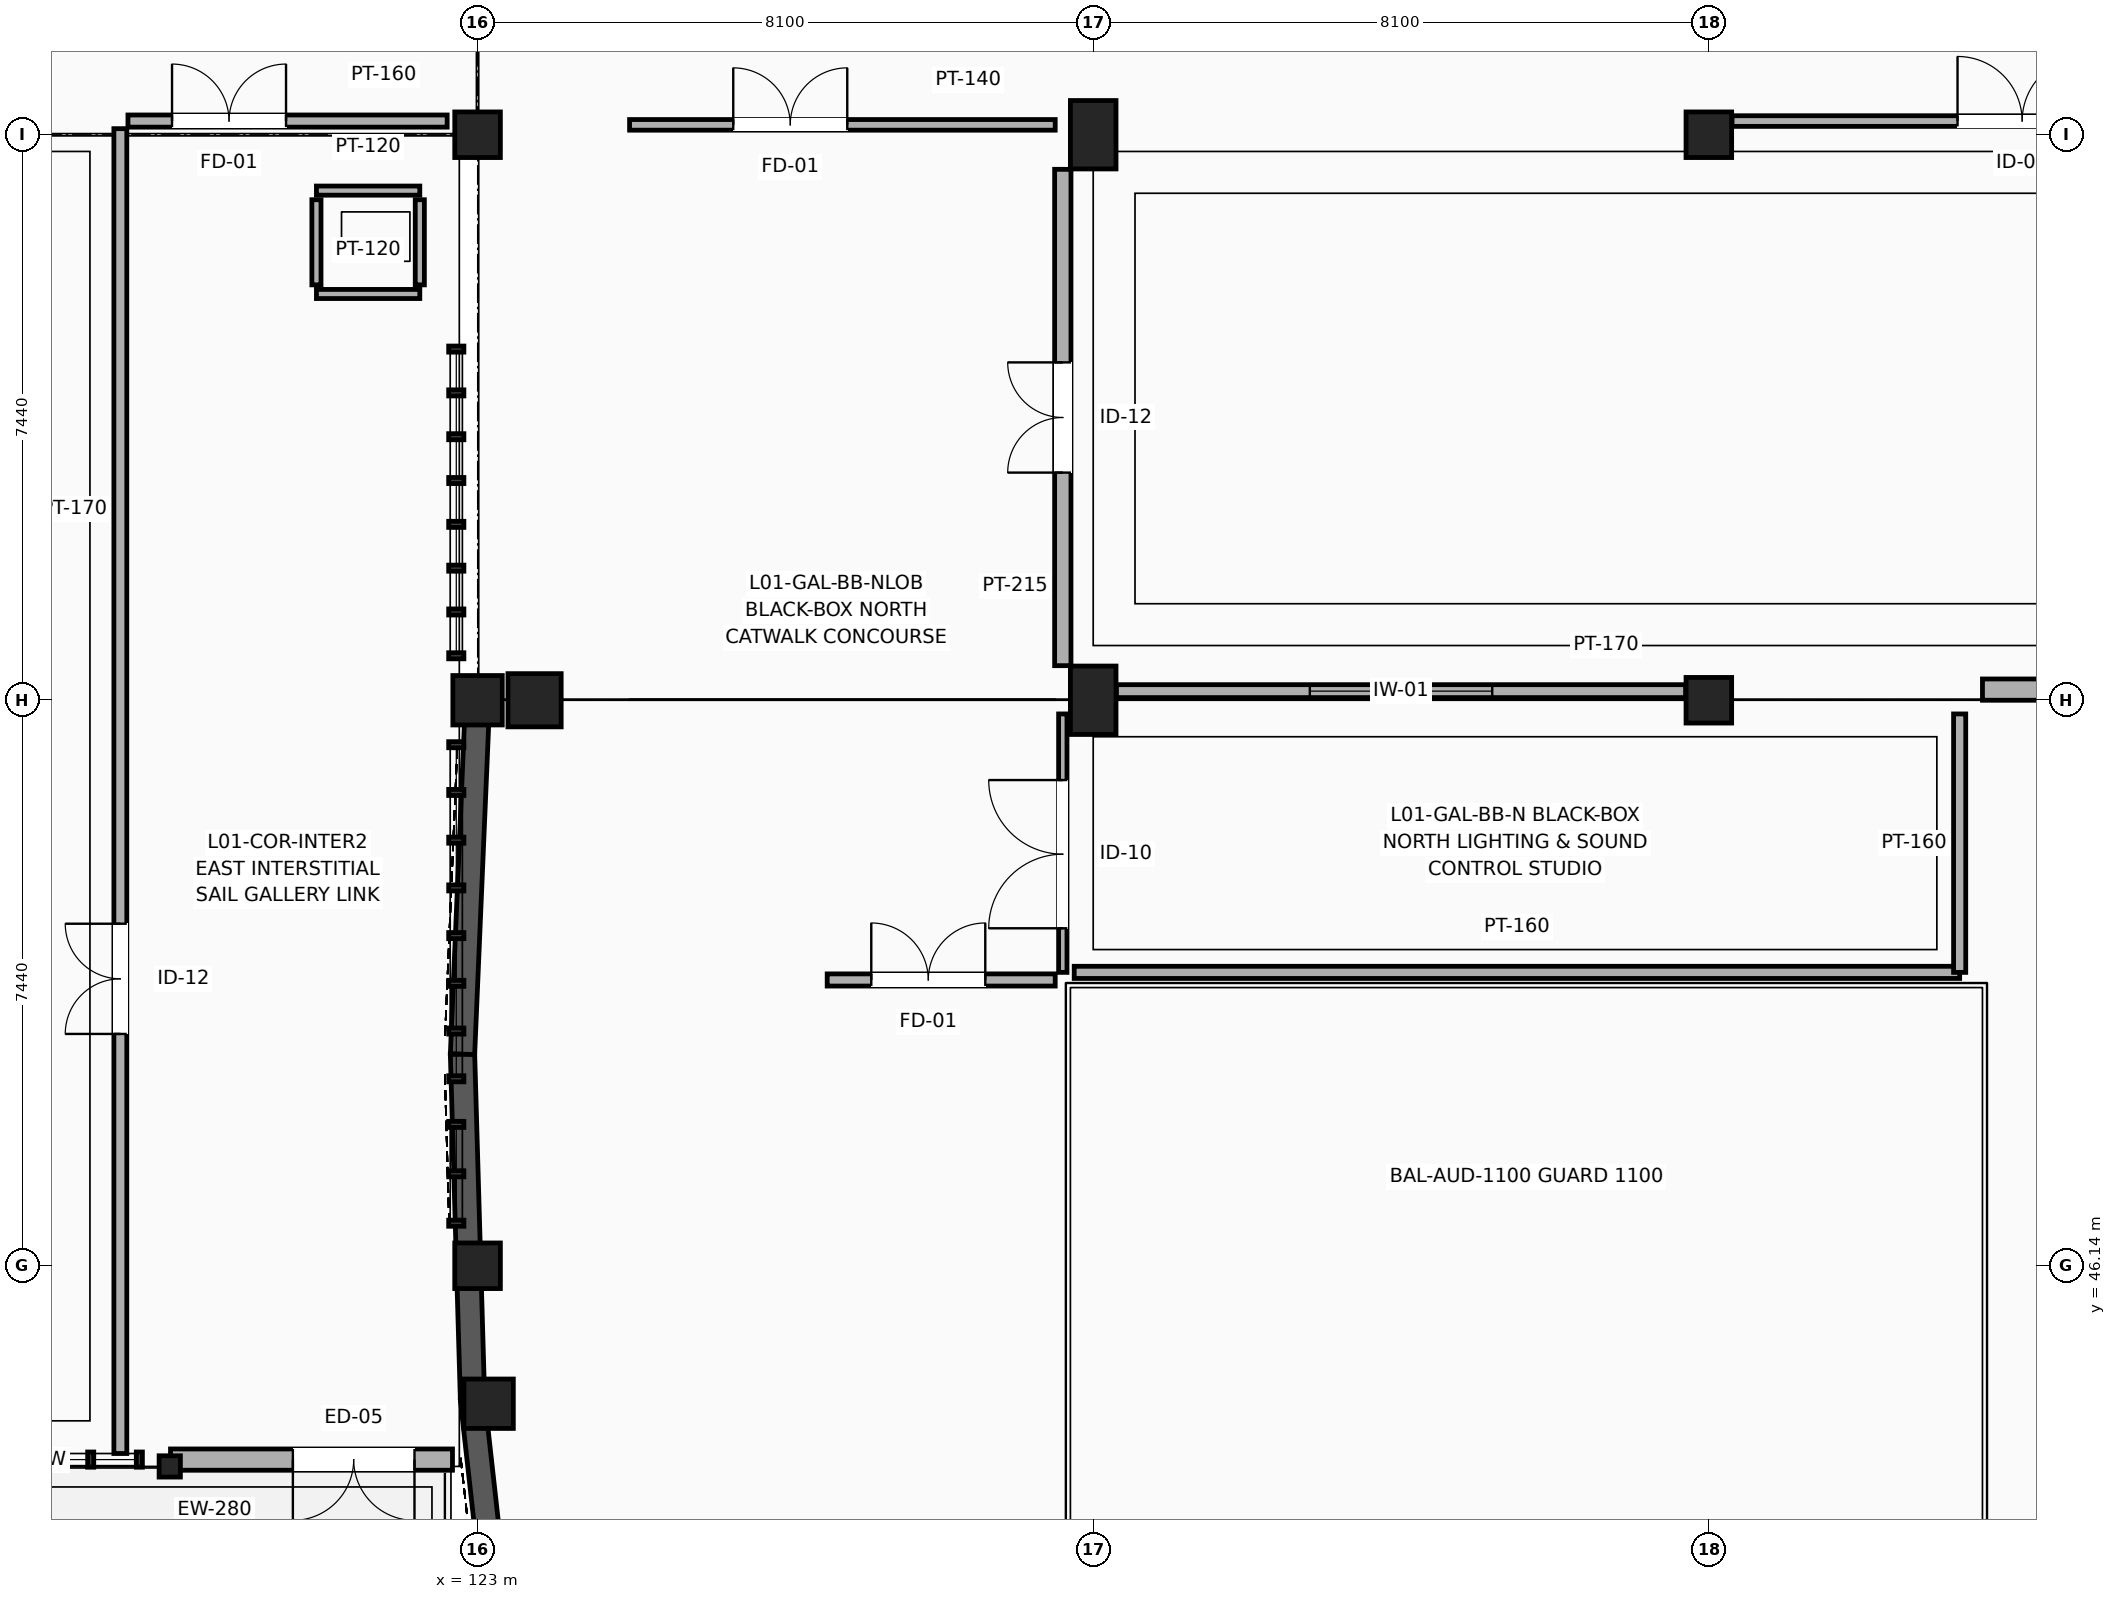
"""IFC4 building model, lengths in metres.
Left out: names, types, materials, properties, quantities, classifications, styles, units other than length and angle.
Written with IfcOpenShell. Run it as: python <this file> out.ifc"""

import sys

from ifc_helpers import new_model, si_unit, direction, frame, frame_2d, origin, origin_2d, place, context, subcontext, project, spatial, rectangle, circle, i_section, extrude, element, fill, save


model = new_model("IFC4")
c1 = context("Model", 3, precision=1e-05, world=origin(), true_north=direction((0.0, 1.0)))
c2 = subcontext(c1, "Body", "Model", "MODEL_VIEW")
j1 = project(units=[si_unit("LENGTHUNIT", "METRE"), si_unit("PLANEANGLEUNIT", "RADIAN")], contexts=[c1])
p1 = place(None, origin())
s1 = spatial("IfcSite", under=j1, at=p1, CompositionType="ELEMENT")
p2 = place(p1, origin())
s2 = spatial("IfcBuilding", under=s1, at=p2, CompositionType="ELEMENT")
p3 = place(p2, frame((0.0, 0.0, 5.4)))
s3 = spatial("IfcBuildingStorey", under=s2, at=p3, CompositionType="ELEMENT", Elevation=5.4)
p4 = place(p3, frame((123.0, 46.14, 0.0), z_axis=(0.0, 0.0, 1.0), x_axis=(1.0, 0.0, 0.0)))
e1 = element("IfcColumn", 1, at=p4, inside=s3, PredefinedType="COLUMN", context=c2, shape_type="SweptSolid", body=[
    extrude(rectangle(XDim=0.6, YDim=0.6, at=origin_2d()), origin(), (0.0, 0.0, 1.0), 4.8),
])
p5 = place(p3, frame((123.0, 53.58, 0.0), z_axis=(0.0, 0.0, 1.0), x_axis=(1.0, 0.0, 0.0)))
e2 = element("IfcColumn", 2, at=p5, inside=s3, PredefinedType="COLUMN", context=c2, shape_type="SweptSolid", body=[
    extrude(circle(Radius=0.325, at=origin_2d()), origin(), (0.0, 0.0, 1.0), 4.8),
])
p6 = place(p3, frame((123.0, 61.02, 0.0), z_axis=(0.0, 0.0, 1.0), x_axis=(1.0, 0.0, 0.0)))
e3 = element("IfcColumn", 3, at=p6, inside=s3, PredefinedType="COLUMN", context=c2, shape_type="SweptSolid", body=[
    extrude(rectangle(XDim=0.6, YDim=0.6, at=origin_2d()), origin(), (0.0, 0.0, 1.0), 4.8),
])
for number, where, z_axis, x_axis in (
    (4, (131.1, 53.58, 0.0), (0.0, 0.0, 1.0), (1.0, 0.0, 0.0)),
    (5, (131.1, 61.02, 0.0), (0.0, 0.0, 1.0), (1.0, 0.0, 0.0)),
):
    element("IfcColumn", number, at=place(p3, frame(where, z_axis=z_axis, x_axis=x_axis)), inside=s3, PredefinedType="COLUMN", context=c2, shape_type="SweptSolid", body=[
        extrude(rectangle(XDim=0.6, YDim=0.9, at=origin_2d()), origin(), (0.0, 0.0, 1.0), 4.8),
    ])
for number, where, z_axis, x_axis in (
    (6, (139.2, 53.58, 0.0), (0.0, 0.0, 1.0), (1.0, 0.0, 0.0)),
    (7, (139.2, 61.02, 0.0), (0.0, 0.0, 1.0), (1.0, 0.0, 0.0)),
):
    element("IfcColumn", number, at=place(p3, frame(where, z_axis=z_axis, x_axis=x_axis)), inside=s3, PredefinedType="COLUMN", context=c2, shape_type="SweptSolid", body=[
        extrude(rectangle(XDim=0.6, YDim=0.6, at=origin_2d()), origin(), (0.0, 0.0, 1.0), 4.8),
    ])
p7 = place(p3, frame((123.75, 53.58, 0.0), z_axis=(0.0, 0.0, 1.0), x_axis=(1.0, 0.0, 0.0)))
e8 = element("IfcColumn", 8, at=p7, inside=s3, PredefinedType="COLUMN", context=c2, shape_type="SweptSolid", body=[
    extrude(rectangle(XDim=0.7, YDim=0.7, at=origin_2d()), origin(), (0.0, 0.0, 1.0), 7.035),
])
p8 = place(p3, frame((123.146, 44.325, 0.0), z_axis=(0.0, 0.0, 1.0), x_axis=(1.0, 0.0, 0.0)))
e9 = element("IfcColumn", 9, at=p8, inside=s3, PredefinedType="COLUMN", context=c2, shape_type="SweptSolid", body=[
    extrude(circle(Radius=0.325, at=origin_2d()), origin(), (0.0, 0.0, 1.0), 8.733),
])
p9 = place(p3, frame((118.95, 43.5, 0.0), z_axis=(0.0, 0.0, 1.0), x_axis=(1.0, 0.0, 0.0)))
e10 = element("IfcColumn", 10, at=p9, inside=s3, PredefinedType="COLUMN", context=c2, shape_type="SweptSolid", body=[
    extrude(i_section(OverallWidth=0.28, OverallDepth=0.28, WebThickness=0.01, FlangeThickness=0.018, FilletRadius=0.024, at=origin_2d()), origin(), (0.0, 0.0, 1.0), 4.8),
])
p10 = place(p3, frame((123.414, 40.069, 0.0), z_axis=(0.0, 0.0, 1.0), x_axis=(-0.110727786474, 0.99385077215, 0.0)))
e11 = element("IfcWall", 11, at=p10, inside=s3, PredefinedType="SHEAR", context=c2, shape_type="SweptSolid", body=[
    extrude(rectangle(XDim=4.341, YDim=0.32, at=frame_2d((2.171, 0.0))), origin(), (0.0, 0.0, 1.0), 9.085),
])
p11 = place(p3, frame((122.933, 44.384, 0.0), z_axis=(0.0, 0.0, 1.0), x_axis=(-0.028914192202, 0.99958189734, 0.0)))
e12 = element("IfcWall", 12, at=p11, inside=s3, PredefinedType="SHEAR", context=c2, shape_type="SweptSolid", body=[
    extrude(rectangle(XDim=4.543, YDim=0.32, at=frame_2d((2.271, 0.0))), origin(), (0.0, 0.0, 1.0), 8.261),
])
p12 = place(p3, frame((122.802, 48.925, 0.0), z_axis=(0.0, 0.0, 1.0), x_axis=(0.042491348944, 0.999096834779, 0.0)))
e13 = element("IfcWall", 13, at=p12, inside=s3, PredefinedType="SHEAR", context=c2, shape_type="SweptSolid", body=[
    extrude(rectangle(XDim=4.66, YDim=0.32, at=frame_2d((2.33, 0.0))), origin(), (0.0, 0.0, 1.0), 7.417),
])
p13 = place(p3, frame((122.67, 43.59, 0.0), z_axis=(0.0, 0.0, 1.0), x_axis=(-1.0, 0.0, 0.0)))
e14 = element("IfcWall", 14, at=p13, inside=s3, PredefinedType="SOLIDWALL", context=c2, shape_type="SweptSolid", body=[
    extrude(rectangle(XDim=3.71, YDim=0.28, at=frame_2d((1.855, 0.0))), origin(), (0.0, 0.0, 1.0), 4.505),
])
p14 = place(p13, frame((0.5, 0.0, 0.0)))
e15 = element("IfcOpeningElement", 15, at=p14, cuts=e14, PredefinedType="OPENING", context=c2, shape_type="SweptSolid", body=[
    extrude(rectangle(XDim=1.6, YDim=2.3, at=frame_2d((0.8, 1.15))), frame((0.0, 0.15, 0.0), z_axis=(0.0, -1.0, 0.0), x_axis=(1.0, 0.0, 0.0)), (0.0, 0.0, 1.0), 0.3),
])
p15 = place(p3, frame((142.8, 53.72, 0.0), z_axis=(0.0, 0.0, 1.0), x_axis=(1.0, 0.0, 0.0)))
e16 = element("IfcWall", 16, at=p15, inside=s3, PredefinedType="SOLIDWALL", context=c2, shape_type="SweptSolid", body=[
    extrude(rectangle(XDim=3.395, YDim=0.28, at=frame_2d((1.698, 0.0))), origin(), (0.0, 0.0, 1.0), 3.687),
])
for number, where, z_axis, x_axis in (
    (17, (120.88, 58.925, 0.0), (0.0, 0.0, 1.0), (1.0, 0.0, 0.0)),
    (18, (120.88, 60.285, 0.0), (0.0, 0.0, 1.0), (1.0, 0.0, 0.0)),
):
    element("IfcWall", number, at=place(p3, frame(where, z_axis=z_axis, x_axis=x_axis)), inside=s3, PredefinedType="PARTITIONING", context=c2, shape_type="SweptSolid", body=[
        extrude(rectangle(XDim=1.36, YDim=0.12, at=frame_2d((0.68, 0.0))), origin(), (0.0, 0.0, 1.0), 4.505),
    ])
for number, where, z_axis, x_axis in (
    (19, (120.88, 59.045, 0.0), (0.0, 0.0, 1.0), (0.0, 1.0, 0.0)),
    (20, (122.24, 59.045, 0.0), (0.0, 0.0, 1.0), (0.0, 1.0, 0.0)),
):
    element("IfcWall", number, at=place(p3, frame(where, z_axis=z_axis, x_axis=x_axis)), inside=s3, PredefinedType="PARTITIONING", context=c2, shape_type="SweptSolid", body=[
        extrude(rectangle(XDim=1.12, YDim=0.12, at=frame_2d((0.56, 0.0))), origin(), (0.0, 0.0, 1.0), 4.505),
    ])
p16 = place(p3, frame((127.6, 49.9, 0.0), z_axis=(0.0, 0.0, 1.0), x_axis=(1.0, 0.0, 0.0)))
e21 = element("IfcWall", 21, at=p16, inside=s3, PredefinedType="PARTITIONING", context=c2, shape_type="SweptSolid", body=[
    extrude(rectangle(XDim=3.0, YDim=0.16, at=frame_2d((1.5, 0.0))), origin(), (0.0, 0.0, 1.0), 4.505),
])
p17 = place(p16, frame((0.58, 0.0, 0.0)))
e22 = element("IfcOpeningElement", 22, at=p17, cuts=e21, PredefinedType="OPENING", context=c2, shape_type="SweptSolid", body=[
    extrude(rectangle(XDim=1.5, YDim=2.2, at=frame_2d((0.75, 1.1))), frame((0.0, 0.09, 0.0), z_axis=(0.0, -1.0, 0.0), x_axis=(1.0, 0.0, 0.0)), (0.0, 0.0, 1.0), 0.18),
])
p18 = place(p3, frame((130.7, 50.0, 0.0), z_axis=(0.0, 0.0, 1.0), x_axis=(0.0, 1.0, 0.0)))
e23 = element("IfcWall", 23, at=p18, inside=s3, PredefinedType="PARTITIONING", context=c2, shape_type="SweptSolid", body=[
    extrude(rectangle(XDim=3.4, YDim=0.11, at=frame_2d((1.7, 0.0))), origin(), (0.0, 0.0, 1.0), 3.687),
])
p19 = place(p18, frame((0.58, 0.0, 0.0)))
e24 = element("IfcOpeningElement", 24, at=p19, cuts=e23, PredefinedType="OPENING", context=c2, shape_type="SweptSolid", body=[
    extrude(rectangle(XDim=1.95, YDim=2.45, at=frame_2d((0.975, 1.225))), frame((0.0, 0.065, 0.0), z_axis=(0.0, -1.0, 0.0), x_axis=(1.0, 0.0, 0.0)), (0.0, 0.0, 1.0), 0.13),
])
p20 = place(p3, frame((125.0, 61.15, 0.0), z_axis=(0.0, 0.0, 1.0), x_axis=(1.0, 0.0, 0.0)))
e25 = element("IfcWall", 25, at=p20, inside=s3, PredefinedType="PARTITIONING", context=c2, shape_type="SweptSolid", body=[
    extrude(rectangle(XDim=5.6, YDim=0.14, at=frame_2d((2.8, 0.0))), origin(), (0.0, 0.0, 1.0), 3.687),
])
p21 = place(p20, frame((1.364, 0.0, 0.0)))
e26 = element("IfcOpeningElement", 26, at=p21, cuts=e25, PredefinedType="OPENING", context=c2, shape_type="SweptSolid", body=[
    extrude(rectangle(XDim=1.5, YDim=2.2, at=frame_2d((0.75, 1.1))), frame((0.0, 0.08, 0.0), z_axis=(0.0, -1.0, 0.0), x_axis=(1.0, 0.0, 0.0)), (0.0, 0.0, 1.0), 0.16),
])
p22 = place(p3, frame((130.7, 54.035, 0.0), z_axis=(0.0, 0.0, 1.0), x_axis=(0.0, 1.0, 0.0)))
e27 = element("IfcWall", 27, at=p22, inside=s3, PredefinedType="PARTITIONING", context=c2, shape_type="SweptSolid", body=[
    extrude(rectangle(XDim=6.53, YDim=0.215, at=frame_2d((3.265, 0.0))), origin(), (0.0, 0.0, 1.0), 4.505),
])
p23 = place(p22, frame((2.54, 0.0, 0.0)))
e28 = element("IfcOpeningElement", 28, at=p23, cuts=e27, PredefinedType="OPENING", context=c2, shape_type="SweptSolid", body=[
    extrude(rectangle(XDim=1.45, YDim=2.3, at=frame_2d((0.725, 1.15))), frame((0.0, 0.117, 0.0), z_axis=(0.0, -1.0, 0.0), x_axis=(1.0, 0.0, 0.0)), (0.0, 0.0, 1.0), 0.235),
])
p24 = place(p3, frame((131.405, 53.7, 0.0), z_axis=(0.0, 0.0, 1.0), x_axis=(1.0, 0.0, 0.0)))
e29 = element("IfcWall", 29, at=p24, inside=s3, PredefinedType="PARTITIONING", context=c2, shape_type="SweptSolid", body=[
    extrude(rectangle(XDim=7.49, YDim=0.17, at=frame_2d((3.745, 0.0))), origin(), (0.0, 0.0, 1.0), 3.987),
])
p25 = place(p24, frame((2.545, 0.0, 1.05)))
e30 = element("IfcOpeningElement", 30, at=p25, cuts=e29, PredefinedType="OPENING", context=c2, shape_type="SweptSolid", body=[
    extrude(rectangle(XDim=2.4, YDim=1.4, at=frame_2d((1.2, 0.7))), frame((0.0, 0.095, 0.0), z_axis=(0.0, -1.0, 0.0), x_axis=(1.0, 0.0, 0.0)), (0.0, 0.0, 1.0), 0.19),
])
p26 = place(p3, frame((118.3, 43.67, 0.0), z_axis=(0.0, 0.0, 1.0), x_axis=(0.0, 1.0, 0.0)))
e31 = element("IfcWall", 31, at=p26, inside=s3, PredefinedType="PARTITIONING", context=c2, shape_type="SweptSolid", body=[
    extrude(rectangle(XDim=17.43, YDim=0.17, at=frame_2d((8.715, 0.0))), origin(), (0.0, 0.0, 1.0), 3.987),
])
p27 = place(p26, frame((5.52, 0.0, 0.0)))
e32 = element("IfcOpeningElement", 32, at=p27, cuts=e31, PredefinedType="OPENING", context=c2, shape_type="SweptSolid", body=[
    extrude(rectangle(XDim=1.45, YDim=2.3, at=frame_2d((0.725, 1.15))), frame((0.0, 0.095, 0.0), z_axis=(0.0, -1.0, 0.0), x_axis=(1.0, 0.0, 0.0)), (0.0, 0.0, 1.0), 0.19),
])
p28 = place(p3, frame((118.4, 61.2, 0.0), z_axis=(0.0, 0.0, 1.0), x_axis=(1.0, 0.0, 0.0)))
e33 = element("IfcWall", 33, at=p28, inside=s3, PredefinedType="PARTITIONING", context=c2, shape_type="SweptSolid", body=[
    extrude(rectangle(XDim=4.2, YDim=0.16, at=frame_2d((2.1, 0.0))), origin(), (0.0, 0.0, 1.0), 4.127),
])
p29 = place(p28, frame((0.58, 0.0, 0.0)))
e34 = element("IfcOpeningElement", 34, at=p29, cuts=e33, PredefinedType="OPENING", context=c2, shape_type="SweptSolid", body=[
    extrude(rectangle(XDim=1.5, YDim=2.2, at=frame_2d((0.75, 1.1))), frame((0.0, 0.09, 0.0), z_axis=(0.0, -1.0, 0.0), x_axis=(1.0, 0.0, 0.0)), (0.0, 0.0, 1.0), 0.18),
])
p30 = place(p3, frame((139.505, 61.2, 0.0), z_axis=(0.0, 0.0, 1.0), x_axis=(1.0, 0.0, 0.0)))
e35 = element("IfcWall", 35, at=p30, inside=s3, PredefinedType="PARTITIONING", context=c2, shape_type="SweptSolid", body=[
    extrude(rectangle(XDim=15.59, YDim=0.14, at=frame_2d((7.795, 0.0))), origin(), (0.0, 0.0, 1.0), 3.687),
])
p31 = place(p30, frame((2.967, 0.0, 0.0)))
e36 = element("IfcOpeningElement", 36, at=p31, cuts=e35, PredefinedType="OPENING", context=c2, shape_type="SweptSolid", body=[
    extrude(rectangle(XDim=1.7, YDim=2.35, at=frame_2d((0.85, 1.175))), frame((0.0, 0.08, 0.0), z_axis=(0.0, -1.0, 0.0), x_axis=(1.0, 0.0, 0.0)), (0.0, 0.0, 1.0), 0.16),
])
p32 = place(p3, frame((130.85, 50.0, 0.0), z_axis=(0.0, 0.0, 1.0), x_axis=(1.0, 0.0, 0.0)))
e37 = element("IfcWall", 37, at=p32, inside=s3, PredefinedType="PARTITIONING", context=c2, shape_type="SweptSolid", body=[
    extrude(rectangle(XDim=11.65, YDim=0.16, at=frame_2d((5.825, 0.0))), origin(), (0.0, 0.0, 1.0), 4.505),
])
p33 = place(p3, frame((142.5, 50.0, 0.0), z_axis=(0.0, 0.0, 1.0), x_axis=(0.0, 1.0, 0.0)))
e38 = element("IfcWall", 38, at=p33, inside=s3, PredefinedType="PARTITIONING", context=c2, shape_type="SweptSolid", body=[
    extrude(rectangle(XDim=3.4, YDim=0.16, at=frame_2d((1.7, 0.0))), origin(), (0.0, 0.0, 1.0), 3.687),
])
p34 = place(p14, origin())
e39 = element("IfcDoor", 39, at=p34, inside=s3, OperationType="DOUBLE_DOOR_SINGLE_SWING", PredefinedType="DOOR", context=c2, shape_type="SweptSolid", body=[
    extrude(rectangle(XDim=1.6, YDim=2.3, at=frame_2d((0.8, 1.15))), frame((0.0, 0.025, 0.0), z_axis=(0.0, -1.0, 0.0), x_axis=(1.0, 0.0, 0.0)), (0.0, 0.0, 1.0), 0.05),
])
fill(e15, e39)
p35 = place(p17, origin())
e40 = element("IfcDoor", 40, at=p35, inside=s3, OperationType="DOUBLE_DOOR_SINGLE_SWING", PredefinedType="DOOR", context=c2, shape_type="SweptSolid", body=[
    extrude(rectangle(XDim=1.5, YDim=2.2, at=frame_2d((0.75, 1.1))), frame((0.0, 0.025, 0.0), z_axis=(0.0, -1.0, 0.0), x_axis=(1.0, 0.0, 0.0)), (0.0, 0.0, 1.0), 0.05),
])
fill(e22, e40)
p36 = place(p19, origin())
e41 = element("IfcDoor", 41, at=p36, inside=s3, OperationType="DOUBLE_DOOR_SINGLE_SWING", PredefinedType="DOOR", context=c2, shape_type="SweptSolid", body=[
    extrude(rectangle(XDim=1.95, YDim=2.45, at=frame_2d((0.975, 1.225))), frame((0.0, 0.025, 0.0), z_axis=(0.0, -1.0, 0.0), x_axis=(1.0, 0.0, 0.0)), (0.0, 0.0, 1.0), 0.05),
])
fill(e24, e41)
p37 = place(p21, origin())
e42 = element("IfcDoor", 42, at=p37, inside=s3, OperationType="DOUBLE_DOOR_SINGLE_SWING", PredefinedType="DOOR", context=c2, shape_type="SweptSolid", body=[
    extrude(rectangle(XDim=1.5, YDim=2.2, at=frame_2d((0.75, 1.1))), frame((0.0, 0.025, 0.0), z_axis=(0.0, -1.0, 0.0), x_axis=(1.0, 0.0, 0.0)), (0.0, 0.0, 1.0), 0.05),
])
fill(e26, e42)
p38 = place(p23, origin())
e43 = element("IfcDoor", 43, at=p38, inside=s3, OperationType="DOUBLE_DOOR_SINGLE_SWING", PredefinedType="DOOR", context=c2, shape_type="SweptSolid", body=[
    extrude(rectangle(XDim=1.45, YDim=2.3, at=frame_2d((0.725, 1.15))), frame((0.0, 0.025, 0.0), z_axis=(0.0, -1.0, 0.0), x_axis=(1.0, 0.0, 0.0)), (0.0, 0.0, 1.0), 0.05),
])
fill(e28, e43)
p39 = place(p25, origin())
e44 = element("IfcWindow", 44, at=p39, inside=s3, PartitioningType="SINGLE_PANEL", PredefinedType="WINDOW", context=c2, shape_type="SweptSolid", body=[
    extrude(rectangle(XDim=2.4, YDim=1.4, at=frame_2d((1.2, 0.7))), frame((0.0, 0.03, 0.0), z_axis=(0.0, -1.0, 0.0), x_axis=(1.0, 0.0, 0.0)), (0.0, 0.0, 1.0), 0.06),
])
fill(e30, e44)
p40 = place(p27, origin())
e45 = element("IfcDoor", 45, at=p40, inside=s3, OperationType="DOUBLE_DOOR_SINGLE_SWING", PredefinedType="DOOR", context=c2, shape_type="SweptSolid", body=[
    extrude(rectangle(XDim=1.45, YDim=2.3, at=frame_2d((0.725, 1.15))), frame((0.0, 0.025, 0.0), z_axis=(0.0, -1.0, 0.0), x_axis=(1.0, 0.0, 0.0)), (0.0, 0.0, 1.0), 0.05),
])
fill(e32, e45)
p41 = place(p29, origin())
e46 = element("IfcDoor", 46, at=p41, inside=s3, OperationType="DOUBLE_DOOR_SINGLE_SWING", PredefinedType="DOOR", context=c2, shape_type="SweptSolid", body=[
    extrude(rectangle(XDim=1.5, YDim=2.2, at=frame_2d((0.75, 1.1))), frame((0.0, 0.025, 0.0), z_axis=(0.0, -1.0, 0.0), x_axis=(1.0, 0.0, 0.0)), (0.0, 0.0, 1.0), 0.05),
])
fill(e34, e46)
p42 = place(p31, origin())
e47 = element("IfcDoor", 47, at=p42, inside=s3, OperationType="DOUBLE_DOOR_SINGLE_SWING", PredefinedType="DOOR", context=c2, shape_type="SweptSolid", body=[
    extrude(rectangle(XDim=1.7, YDim=2.35, at=frame_2d((0.85, 1.175))), frame((0.0, 0.025, 0.0), z_axis=(0.0, -1.0, 0.0), x_axis=(1.0, 0.0, 0.0)), (0.0, 0.0, 1.0), 0.05),
])
fill(e36, e47)
save(model, sys.argv[1])
